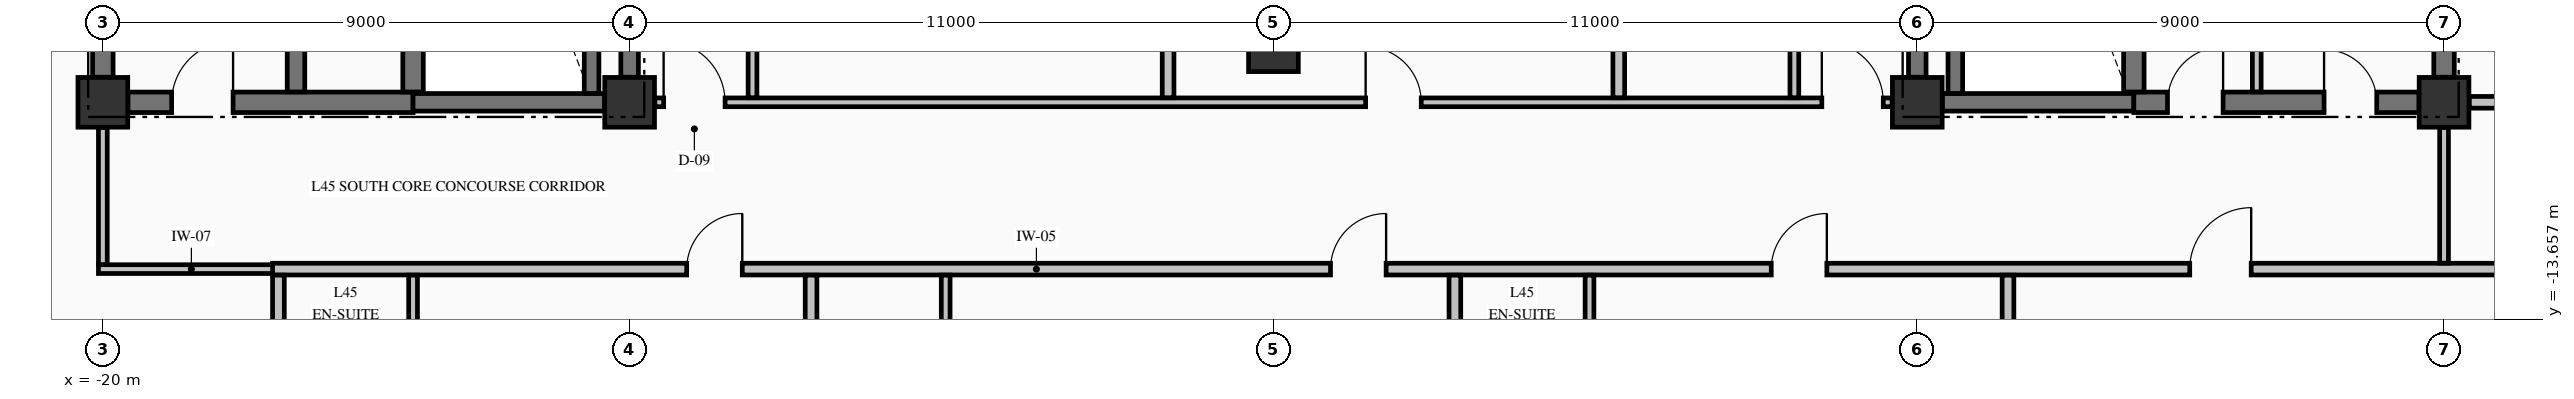
"""IFC4 building model, lengths in metres.
Left out: names, types, materials, properties, quantities, classifications, styles, units other than length and angle.
Written with IfcOpenShell. Run it as: python <this file> out.ifc"""

import sys

from ifc_helpers import new_model, si_unit, direction, frame, frame_2d, origin, origin_2d, place, context, subcontext, project, spatial, rectangle, extrude, element, fill, save


model = new_model("IFC4")
c1 = context("Model", 3, precision=1e-05, world=origin(), true_north=direction((0.0, 1.0)))
c2 = subcontext(c1, "Body", "Model", "MODEL_VIEW")
j1 = project(units=[si_unit("LENGTHUNIT", "METRE"), si_unit("PLANEANGLEUNIT", "RADIAN")], contexts=[c1])
p1 = place(None, origin())
s1 = spatial("IfcSite", under=j1, at=p1, CompositionType="ELEMENT")
p2 = place(p1, origin())
s2 = spatial("IfcBuilding", under=s1, at=p2, CompositionType="ELEMENT")
p3 = place(p2, frame((0.0, 0.0, 176.26)))
s3 = spatial("IfcBuildingStorey", under=s2, at=p3, CompositionType="ELEMENT", Elevation=176.26)
for number, where, z_axis, x_axis in (
    (1, (-20.0, -9.95, -0.275), (0.0, 0.0, 1.0), (1.0, 0.0, 0.0)),
    (2, (-11.0, -9.95, -0.275), (0.0, 0.0, 1.0), (1.0, 0.0, 0.0)),
    (3, (11.0, -9.95, -0.275), (0.0, 0.0, 1.0), (1.0, 0.0, 0.0)),
    (4, (20.0, -9.95, -0.275), (0.0, 0.0, 1.0), (1.0, 0.0, 0.0)),
    (5, (0.0, -9.0, -0.275), (0.0, 0.0, 1.0), (1.0, 0.0, 0.0)),
):
    element("IfcColumn", number, at=place(p3, frame(where, z_axis=z_axis, x_axis=x_axis)), inside=s3, PredefinedType="COLUMN", context=c2, shape_type="SweptSolid", body=[
        extrude(rectangle(XDim=0.85, YDim=0.85, at=origin_2d()), origin(), (0.0, 0.0, 1.0), 3.425),
    ])
p4 = place(p3, frame((-19.571, -9.95, 0.0), z_axis=(0.0, 0.0, 1.0), x_axis=(1.0, 0.0, 0.0)))
e6 = element("IfcWall", 6, at=p4, inside=s3, PredefinedType="SHEAR", context=c2, shape_type="SweptSolid", body=[
    extrude(rectangle(XDim=4.871, YDim=0.35, at=frame_2d((2.436, 0.0))), origin(), (0.0, 0.0, 1.0), 3.15),
])
p5 = place(p4, frame((0.746, 0.0, 0.0)))
e7 = element("IfcOpeningElement", 7, at=p5, cuts=e6, PredefinedType="OPENING", context=c2, shape_type="SweptSolid", body=[
    extrude(rectangle(XDim=1.05, YDim=2.15, at=frame_2d((0.525, 1.075))), frame((0.0, 0.185, 0.0), z_axis=(0.0, -1.0, 0.0), x_axis=(1.0, 0.0, 0.0)), (0.0, 0.0, 1.0), 0.37),
])
for number, where, z_axis, x_axis in (
    (8, (-14.7, -9.95, 0.0), (0.0, 0.0, 1.0), (1.0, 0.0, 0.0)),
    (9, (11.429, -9.95, 0.0), (0.0, 0.0, 1.0), (1.0, 0.0, 0.0)),
):
    element("IfcWall", number, at=place(p3, frame(where, z_axis=z_axis, x_axis=x_axis)), inside=s3, PredefinedType="SHEAR", context=c2, shape_type="SweptSolid", body=[
        extrude(rectangle(XDim=3.271, YDim=0.3, at=frame_2d((1.635, 0.0))), origin(), (0.0, 0.0, 1.0), 3.15),
    ])
p6 = place(p3, frame((14.7, -9.95, 0.0), z_axis=(0.0, 0.0, 1.0), x_axis=(1.0, 0.0, 0.0)))
e10 = element("IfcWall", 10, at=p6, inside=s3, PredefinedType="SHEAR", context=c2, shape_type="SweptSolid", body=[
    extrude(rectangle(XDim=4.871, YDim=0.35, at=frame_2d((2.436, 0.0))), origin(), (0.0, 0.0, 1.0), 3.15),
])
p7 = place(p6, frame((3.25, 0.0, 0.0)))
e11 = element("IfcOpeningElement", 11, at=p7, cuts=e10, PredefinedType="OPENING", context=c2, shape_type="SweptSolid", body=[
    extrude(rectangle(XDim=0.9, YDim=2.15, at=frame_2d((0.45, 1.075))), frame((0.0, 0.185, 0.0), z_axis=(0.0, -1.0, 0.0), x_axis=(1.0, 0.0, 0.0)), (0.0, 0.0, 1.0), 0.37),
])
p8 = place(p6, frame((0.575, 0.0, 0.0)))
e12 = element("IfcOpeningElement", 12, at=p8, cuts=e10, PredefinedType="OPENING", context=c2, shape_type="SweptSolid", body=[
    extrude(rectangle(XDim=0.95, YDim=2.15, at=frame_2d((0.475, 1.075))), frame((0.0, 0.185, 0.0), z_axis=(0.0, -1.0, 0.0), x_axis=(1.0, 0.0, 0.0)), (0.0, 0.0, 1.0), 0.37),
])
p9 = place(p3, frame((-20.075, -12.8, 0.0), z_axis=(0.0, 0.0, 1.0), x_axis=(1.0, 0.0, 0.0)))
e13 = element("IfcWall", 13, at=p9, inside=s3, PredefinedType="PARTITIONING", context=c2, shape_type="SweptSolid", body=[
    extrude(rectangle(XDim=3.175, YDim=0.15, at=frame_2d((1.587, 0.0))), origin(), (0.0, 0.0, 1.0), 3.15),
])
p10 = place(p3, frame((-17.1, -12.8, 0.0), z_axis=(0.0, 0.0, 1.0), x_axis=(1.0, 0.0, 0.0)))
e14 = element("IfcWall", 14, at=p10, inside=s3, PredefinedType="PARTITIONING", context=c2, shape_type="SweptSolid", body=[
    extrude(rectangle(XDim=39.2, YDim=0.2, at=frame_2d((19.6, 0.0))), origin(), (0.0, 0.0, 1.0), 3.15),
])
p11 = place(p10, frame((7.075, 0.0, 0.0)))
e15 = element("IfcOpeningElement", 15, at=p11, cuts=e14, PredefinedType="OPENING", context=c2, shape_type="SweptSolid", body=[
    extrude(rectangle(XDim=0.95, YDim=2.15, at=frame_2d((0.475, 1.075))), frame((0.0, 0.11, 0.0), z_axis=(0.0, -1.0, 0.0), x_axis=(1.0, 0.0, 0.0)), (0.0, 0.0, 1.0), 0.22),
])
p12 = place(p10, frame((18.075, 0.0, 0.0)))
e16 = element("IfcOpeningElement", 16, at=p12, cuts=e14, PredefinedType="OPENING", context=c2, shape_type="SweptSolid", body=[
    extrude(rectangle(XDim=0.95, YDim=2.15, at=frame_2d((0.475, 1.075))), frame((0.0, 0.11, 0.0), z_axis=(0.0, -1.0, 0.0), x_axis=(1.0, 0.0, 0.0)), (0.0, 0.0, 1.0), 0.22),
])
p13 = place(p10, frame((25.605, 0.0, 0.0)))
e17 = element("IfcOpeningElement", 17, at=p13, cuts=e14, PredefinedType="OPENING", context=c2, shape_type="SweptSolid", body=[
    extrude(rectangle(XDim=0.95, YDim=2.15, at=frame_2d((0.475, 1.075))), frame((0.0, 0.11, 0.0), z_axis=(0.0, -1.0, 0.0), x_axis=(1.0, 0.0, 0.0)), (0.0, 0.0, 1.0), 0.22),
])
p14 = place(p10, frame((32.755, 0.0, 0.0)))
e18 = element("IfcOpeningElement", 18, at=p14, cuts=e14, PredefinedType="OPENING", context=c2, shape_type="SweptSolid", body=[
    extrude(rectangle(XDim=1.05, YDim=2.15, at=frame_2d((0.525, 1.075))), frame((0.0, 0.11, 0.0), z_axis=(0.0, -1.0, 0.0), x_axis=(1.0, 0.0, 0.0)), (0.0, 0.0, 1.0), 0.22),
])
p15 = place(p3, frame((-10.569, -9.95, 0.0), z_axis=(0.0, 0.0, 1.0), x_axis=(1.0, 0.0, 0.0)))
e19 = element("IfcWall", 19, at=p15, inside=s3, PredefinedType="PARTITIONING", context=c2, shape_type="SweptSolid", body=[
    extrude(rectangle(XDim=21.138, YDim=0.15, at=frame_2d((10.569, 0.0))), origin(), (0.0, 0.0, 1.0), 3.15),
])
p16 = place(p15, frame((0.15, 0.0, 0.0)))
e20 = element("IfcOpeningElement", 20, at=p16, cuts=e19, PredefinedType="OPENING", context=c2, shape_type="SweptSolid", body=[
    extrude(rectangle(XDim=1.05, YDim=2.15, at=frame_2d((0.525, 1.075))), frame((0.0, 0.085, 0.0), z_axis=(0.0, -1.0, 0.0), x_axis=(1.0, 0.0, 0.0)), (0.0, 0.0, 1.0), 0.17),
])
p17 = place(p15, frame((19.938, 0.0, 0.0)))
e21 = element("IfcOpeningElement", 21, at=p17, cuts=e19, PredefinedType="OPENING", context=c2, shape_type="SweptSolid", body=[
    extrude(rectangle(XDim=1.05, YDim=2.15, at=frame_2d((0.525, 1.075))), frame((0.0, 0.085, 0.0), z_axis=(0.0, -1.0, 0.0), x_axis=(1.0, 0.0, 0.0)), (0.0, 0.0, 1.0), 0.17),
])
p18 = place(p15, frame((12.144, 0.0, 0.0)))
e22 = element("IfcOpeningElement", 22, at=p18, cuts=e19, PredefinedType="OPENING", context=c2, shape_type="SweptSolid", body=[
    extrude(rectangle(XDim=0.95, YDim=2.15, at=frame_2d((0.475, 1.075))), frame((0.0, 0.085, 0.0), z_axis=(0.0, -1.0, 0.0), x_axis=(1.0, 0.0, 0.0)), (0.0, 0.0, 1.0), 0.17),
])
p19 = place(p3, frame((20.431, -9.95, 0.0), z_axis=(0.0, 0.0, 1.0), x_axis=(1.0, 0.0, 0.0)))
e23 = element("IfcWall", 23, at=p19, inside=s3, PredefinedType="PARTITIONING", context=c2, shape_type="SweptSolid", body=[
    extrude(rectangle(XDim=6.404, YDim=0.2, at=frame_2d((3.202, 0.0))), origin(), (0.0, 0.0, 1.0), 3.15),
])
p20 = place(p3, frame((-20.0, -9.521, 0.0), z_axis=(0.0, 0.0, 1.0), x_axis=(0.0, 1.0, 0.0)))
e24 = element("IfcWall", 24, at=p20, inside=s3, PredefinedType="SHEAR", context=c2, shape_type="SweptSolid", body=[
    extrude(rectangle(XDim=9.092, YDim=0.35, at=frame_2d((4.546, 0.0))), origin(), (0.0, 0.0, 1.0), 3.15),
])
p21 = place(p3, frame((-16.7, -9.773, 0.0), z_axis=(0.0, 0.0, 1.0), x_axis=(0.0, 1.0, 0.0)))
e25 = element("IfcWall", 25, at=p21, inside=s3, PredefinedType="SHEAR", context=c2, shape_type="SweptSolid", body=[
    extrude(rectangle(XDim=9.371, YDim=0.3, at=frame_2d((4.686, 0.0))), origin(), (0.0, 0.0, 1.0), 3.15),
])
p22 = place(p3, frame((-14.7, -9.773, 0.0), z_axis=(0.0, 0.0, 1.0), x_axis=(0.0, 1.0, 0.0)))
e26 = element("IfcWall", 26, at=p22, inside=s3, PredefinedType="SHEAR", context=c2, shape_type="SweptSolid", body=[
    extrude(rectangle(XDim=9.371, YDim=0.35, at=frame_2d((4.686, 0.0))), origin(), (0.0, 0.0, 1.0), 3.15),
])
p23 = place(p3, frame((-11.65, -9.798, 0.0), z_axis=(0.0, 0.0, 1.0), x_axis=(0.0, 1.0, 0.0)))
e27 = element("IfcWall", 27, at=p23, inside=s3, PredefinedType="SOLIDWALL", context=c2, shape_type="SweptSolid", body=[
    extrude(rectangle(XDim=9.396, YDim=0.25, at=frame_2d((4.698, 0.0))), origin(), (0.0, 0.0, 1.0), 3.15),
])
for number, where, z_axis, x_axis in (
    (28, (-11.0, -9.521, 0.0), (0.0, 0.0, 1.0), (0.0, 1.0, 0.0)),
    (29, (11.0, -9.521, 0.0), (0.0, 0.0, 1.0), (0.0, 1.0, 0.0)),
):
    element("IfcWall", number, at=place(p3, frame(where, z_axis=z_axis, x_axis=x_axis)), inside=s3, PredefinedType="SHEAR", context=c2, shape_type="SweptSolid", body=[
        extrude(rectangle(XDim=9.092, YDim=0.3, at=frame_2d((4.546, 0.0))), origin(), (0.0, 0.0, 1.0), 3.15),
    ])
p24 = place(p3, frame((11.65, -9.798, 0.0), z_axis=(0.0, 0.0, 1.0), x_axis=(0.0, 1.0, 0.0)))
e30 = element("IfcWall", 30, at=p24, inside=s3, PredefinedType="SOLIDWALL", context=c2, shape_type="SweptSolid", body=[
    extrude(rectangle(XDim=9.396, YDim=0.25, at=frame_2d((4.698, 0.0))), origin(), (0.0, 0.0, 1.0), 3.15),
])
p25 = place(p3, frame((14.7, -9.773, 0.0), z_axis=(0.0, 0.0, 1.0), x_axis=(0.0, 1.0, 0.0)))
e31 = element("IfcWall", 31, at=p25, inside=s3, PredefinedType="SHEAR", context=c2, shape_type="SweptSolid", body=[
    extrude(rectangle(XDim=9.371, YDim=0.35, at=frame_2d((4.686, 0.0))), origin(), (0.0, 0.0, 1.0), 3.15),
])
p26 = place(p3, frame((20.0, -9.521, 0.0), z_axis=(0.0, 0.0, 1.0), x_axis=(0.0, 1.0, 0.0)))
e32 = element("IfcWall", 32, at=p26, inside=s3, PredefinedType="SHEAR", context=c2, shape_type="SweptSolid", body=[
    extrude(rectangle(XDim=9.092, YDim=0.35, at=frame_2d((4.546, 0.0))), origin(), (0.0, 0.0, 1.0), 3.15),
])
p27 = place(p3, frame((-20.0, -12.722, 0.0), z_axis=(0.0, 0.0, 1.0), x_axis=(0.0, 1.0, 0.0)))
e33 = element("IfcWall", 33, at=p27, inside=s3, PredefinedType="PARTITIONING", context=c2, shape_type="SweptSolid", body=[
    extrude(rectangle(XDim=2.341, YDim=0.15, at=frame_2d((1.17, 0.0))), origin(), (0.0, 0.0, 1.0), 2.342),
])
p28 = place(p3, frame((-17.0, -15.672, 0.0), z_axis=(0.0, 0.0, 1.0), x_axis=(0.0, 1.0, 0.0)))
e34 = element("IfcWall", 34, at=p28, inside=s3, PredefinedType="PARTITIONING", context=c2, shape_type="SweptSolid", body=[
    extrude(rectangle(XDim=2.769, YDim=0.2, at=frame_2d((1.385, 0.0))), origin(), (0.0, 0.0, 1.0), 3.15),
])
p29 = place(p3, frame((-14.7, -15.672, 0.0), z_axis=(0.0, 0.0, 1.0), x_axis=(0.0, 1.0, 0.0)))
e35 = element("IfcWall", 35, at=p29, inside=s3, PredefinedType="PARTITIONING", context=c2, shape_type="SweptSolid", body=[
    extrude(rectangle(XDim=2.769, YDim=0.15, at=frame_2d((1.385, 0.0))), origin(), (0.0, 0.0, 1.0), 3.15),
])
p30 = place(p3, frame((-8.9, -9.872, 0.0), z_axis=(0.0, 0.0, 1.0), x_axis=(0.0, 1.0, 0.0)))
e36 = element("IfcWall", 36, at=p30, inside=s3, PredefinedType="PARTITIONING", context=c2, shape_type="SweptSolid", body=[
    extrude(rectangle(XDim=7.169, YDim=0.15, at=frame_2d((3.584, 0.0))), origin(), (0.0, 0.0, 1.0), 3.15),
])
p31 = place(p30, frame((3.102, 0.0, 0.0)))
e37 = element("IfcOpeningElement", 37, at=p31, cuts=e36, PredefinedType="OPENING", context=c2, shape_type="SweptSolid", body=[
    extrude(rectangle(XDim=1.0, YDim=2.15, at=frame_2d((0.5, 1.075))), frame((0.0, 0.085, 0.0), z_axis=(0.0, -1.0, 0.0), x_axis=(1.0, 0.0, 0.0)), (0.0, 0.0, 1.0), 0.17),
])
p32 = place(p3, frame((-7.9, -14.972, 0.0), z_axis=(0.0, 0.0, 1.0), x_axis=(0.0, 1.0, 0.0)))
e38 = element("IfcWall", 38, at=p32, inside=s3, PredefinedType="PARTITIONING", context=c2, shape_type="SweptSolid", body=[
    extrude(rectangle(XDim=2.069, YDim=0.2, at=frame_2d((1.034, 0.0))), origin(), (0.0, 0.0, 1.0), 3.15),
])
p33 = place(p3, frame((-5.6, -14.972, 0.0), z_axis=(0.0, 0.0, 1.0), x_axis=(0.0, 1.0, 0.0)))
e39 = element("IfcWall", 39, at=p33, inside=s3, PredefinedType="PARTITIONING", context=c2, shape_type="SweptSolid", body=[
    extrude(rectangle(XDim=2.069, YDim=0.15, at=frame_2d((1.034, 0.0))), origin(), (0.0, 0.0, 1.0), 3.15),
])
p34 = place(p3, frame((-1.8, -9.872, 0.0), z_axis=(0.0, 0.0, 1.0), x_axis=(0.0, 1.0, 0.0)))
e40 = element("IfcWall", 40, at=p34, inside=s3, PredefinedType="PARTITIONING", context=c2, shape_type="SweptSolid", body=[
    extrude(rectangle(XDim=4.569, YDim=0.2, at=frame_2d((2.285, 0.0))), origin(), (0.0, 0.0, 1.0), 3.15),
])
p35 = place(p3, frame((3.1, -15.672, 0.0), z_axis=(0.0, 0.0, 1.0), x_axis=(0.0, 1.0, 0.0)))
e41 = element("IfcWall", 41, at=p35, inside=s3, PredefinedType="PARTITIONING", context=c2, shape_type="SweptSolid", body=[
    extrude(rectangle(XDim=2.769, YDim=0.2, at=frame_2d((1.385, 0.0))), origin(), (0.0, 0.0, 1.0), 3.15),
])
p36 = place(p3, frame((5.4, -15.672, 0.0), z_axis=(0.0, 0.0, 1.0), x_axis=(0.0, 1.0, 0.0)))
e42 = element("IfcWall", 42, at=p36, inside=s3, PredefinedType="PARTITIONING", context=c2, shape_type="SweptSolid", body=[
    extrude(rectangle(XDim=2.769, YDim=0.15, at=frame_2d((1.385, 0.0))), origin(), (0.0, 0.0, 1.0), 3.15),
])
p37 = place(p3, frame((5.9, -9.872, 0.0), z_axis=(0.0, 0.0, 1.0), x_axis=(0.0, 1.0, 0.0)))
e43 = element("IfcWall", 43, at=p37, inside=s3, PredefinedType="PARTITIONING", context=c2, shape_type="SweptSolid", body=[
    extrude(rectangle(XDim=4.569, YDim=0.2, at=frame_2d((2.285, 0.0))), origin(), (0.0, 0.0, 1.0), 3.15),
])
p38 = place(p3, frame((8.9, -9.872, 0.0), z_axis=(0.0, 0.0, 1.0), x_axis=(0.0, 1.0, 0.0)))
e44 = element("IfcWall", 44, at=p38, inside=s3, PredefinedType="PARTITIONING", context=c2, shape_type="SweptSolid", body=[
    extrude(rectangle(XDim=4.569, YDim=0.15, at=frame_2d((2.285, 0.0))), origin(), (0.0, 0.0, 1.0), 3.15),
])
p39 = place(p38, frame((1.847, 0.0, 0.0)))
e45 = element("IfcOpeningElement", 45, at=p39, cuts=e44, PredefinedType="OPENING", context=c2, shape_type="SweptSolid", body=[
    extrude(rectangle(XDim=0.95, YDim=2.15, at=frame_2d((0.475, 1.075))), frame((0.0, 0.085, 0.0), z_axis=(0.0, -1.0, 0.0), x_axis=(1.0, 0.0, 0.0)), (0.0, 0.0, 1.0), 0.17),
])
p40 = place(p3, frame((12.55, -24.335, 0.0), z_axis=(0.0, 0.0, 1.0), x_axis=(0.0, 1.0, 0.0)))
e46 = element("IfcWall", 46, at=p40, inside=s3, PredefinedType="PARTITIONING", context=c2, shape_type="SweptSolid", body=[
    extrude(rectangle(XDim=11.432, YDim=0.2, at=frame_2d((5.716, 0.0))), origin(), (0.0, 0.0, 1.0), 3.15),
])
p41 = place(p3, frame((16.8, -9.772, 0.0), z_axis=(0.0, 0.0, 1.0), x_axis=(0.0, 1.0, 0.0)))
e47 = element("IfcWall", 47, at=p41, inside=s3, PredefinedType="PARTITIONING", context=c2, shape_type="SweptSolid", body=[
    extrude(rectangle(XDim=7.194, YDim=0.15, at=frame_2d((3.597, 0.0))), origin(), (0.0, 0.0, 1.0), 3.15),
])
p42 = place(p3, frame((20.0, -12.697, 0.0), z_axis=(0.0, 0.0, 1.0), x_axis=(0.0, 1.0, 0.0)))
e48 = element("IfcWall", 48, at=p42, inside=s3, PredefinedType="PARTITIONING", context=c2, shape_type="SweptSolid", body=[
    extrude(rectangle(XDim=2.316, YDim=0.15, at=frame_2d((1.158, 0.0))), origin(), (0.0, 0.0, 1.0), 2.342),
])
p43 = place(p5, origin())
e49 = element("IfcDoor", 49, at=p43, inside=s3, OperationType="SINGLE_SWING_RIGHT", PredefinedType="DOOR", context=c2, shape_type="SweptSolid", body=[
    extrude(rectangle(XDim=1.05, YDim=2.15, at=frame_2d((0.525, 1.075))), frame((0.0, 0.025, 0.0), z_axis=(0.0, -1.0, 0.0), x_axis=(1.0, 0.0, 0.0)), (0.0, 0.0, 1.0), 0.05),
])
fill(e7, e49)
p44 = place(p7, origin())
e50 = element("IfcDoor", 50, at=p44, inside=s3, OperationType="SINGLE_SWING_LEFT", PredefinedType="DOOR", context=c2, shape_type="SweptSolid", body=[
    extrude(rectangle(XDim=0.9, YDim=2.15, at=frame_2d((0.45, 1.075))), frame((0.0, 0.025, 0.0), z_axis=(0.0, -1.0, 0.0), x_axis=(1.0, 0.0, 0.0)), (0.0, 0.0, 1.0), 0.05),
])
fill(e11, e50)
p45 = place(p8, origin())
e51 = element("IfcDoor", 51, at=p45, inside=s3, OperationType="SINGLE_SWING_RIGHT", PredefinedType="DOOR", context=c2, shape_type="SweptSolid", body=[
    extrude(rectangle(XDim=0.95, YDim=2.15, at=frame_2d((0.475, 1.075))), frame((0.0, 0.025, 0.0), z_axis=(0.0, -1.0, 0.0), x_axis=(1.0, 0.0, 0.0)), (0.0, 0.0, 1.0), 0.05),
])
fill(e12, e51)
p46 = place(p16, origin())
e52 = element("IfcDoor", 52, at=p46, inside=s3, OperationType="SINGLE_SWING_LEFT", PredefinedType="DOOR", context=c2, shape_type="SweptSolid", body=[
    extrude(rectangle(XDim=1.05, YDim=2.15, at=frame_2d((0.525, 1.075))), frame((0.0, 0.025, 0.0), z_axis=(0.0, -1.0, 0.0), x_axis=(1.0, 0.0, 0.0)), (0.0, 0.0, 1.0), 0.05),
])
fill(e20, e52)
p47 = place(p17, origin())
e53 = element("IfcDoor", 53, at=p47, inside=s3, OperationType="SINGLE_SWING_LEFT", PredefinedType="DOOR", context=c2, shape_type="SweptSolid", body=[
    extrude(rectangle(XDim=1.05, YDim=2.15, at=frame_2d((0.525, 1.075))), frame((0.0, 0.025, 0.0), z_axis=(0.0, -1.0, 0.0), x_axis=(1.0, 0.0, 0.0)), (0.0, 0.0, 1.0), 0.05),
])
fill(e21, e53)
p48 = place(p11, origin())
e54 = element("IfcDoor", 54, at=p48, inside=s3, OperationType="SINGLE_SWING_RIGHT", PredefinedType="DOOR", context=c2, shape_type="SweptSolid", body=[
    extrude(rectangle(XDim=0.95, YDim=2.15, at=frame_2d((0.475, 1.075))), frame((0.0, 0.025, 0.0), z_axis=(0.0, -1.0, 0.0), x_axis=(1.0, 0.0, 0.0)), (0.0, 0.0, 1.0), 0.05),
])
fill(e15, e54)
p49 = place(p12, origin())
e55 = element("IfcDoor", 55, at=p49, inside=s3, OperationType="SINGLE_SWING_RIGHT", PredefinedType="DOOR", context=c2, shape_type="SweptSolid", body=[
    extrude(rectangle(XDim=0.95, YDim=2.15, at=frame_2d((0.475, 1.075))), frame((0.0, 0.025, 0.0), z_axis=(0.0, -1.0, 0.0), x_axis=(1.0, 0.0, 0.0)), (0.0, 0.0, 1.0), 0.05),
])
fill(e16, e55)
p50 = place(p13, origin())
e56 = element("IfcDoor", 56, at=p50, inside=s3, OperationType="SINGLE_SWING_RIGHT", PredefinedType="DOOR", context=c2, shape_type="SweptSolid", body=[
    extrude(rectangle(XDim=0.95, YDim=2.15, at=frame_2d((0.475, 1.075))), frame((0.0, 0.025, 0.0), z_axis=(0.0, -1.0, 0.0), x_axis=(1.0, 0.0, 0.0)), (0.0, 0.0, 1.0), 0.05),
])
fill(e17, e56)
p51 = place(p14, origin())
e57 = element("IfcDoor", 57, at=p51, inside=s3, OperationType="SINGLE_SWING_RIGHT", PredefinedType="DOOR", context=c2, shape_type="SweptSolid", body=[
    extrude(rectangle(XDim=1.05, YDim=2.15, at=frame_2d((0.525, 1.075))), frame((0.0, 0.025, 0.0), z_axis=(0.0, -1.0, 0.0), x_axis=(1.0, 0.0, 0.0)), (0.0, 0.0, 1.0), 0.05),
])
fill(e18, e57)
p52 = place(p18, origin())
e58 = element("IfcDoor", 58, at=p52, inside=s3, OperationType="SINGLE_SWING_LEFT", PredefinedType="DOOR", context=c2, shape_type="SweptSolid", body=[
    extrude(rectangle(XDim=0.95, YDim=2.15, at=frame_2d((0.475, 1.075))), frame((0.0, 0.025, 0.0), z_axis=(0.0, -1.0, 0.0), x_axis=(1.0, 0.0, 0.0)), (0.0, 0.0, 1.0), 0.05),
])
fill(e22, e58)
save(model, sys.argv[1])
